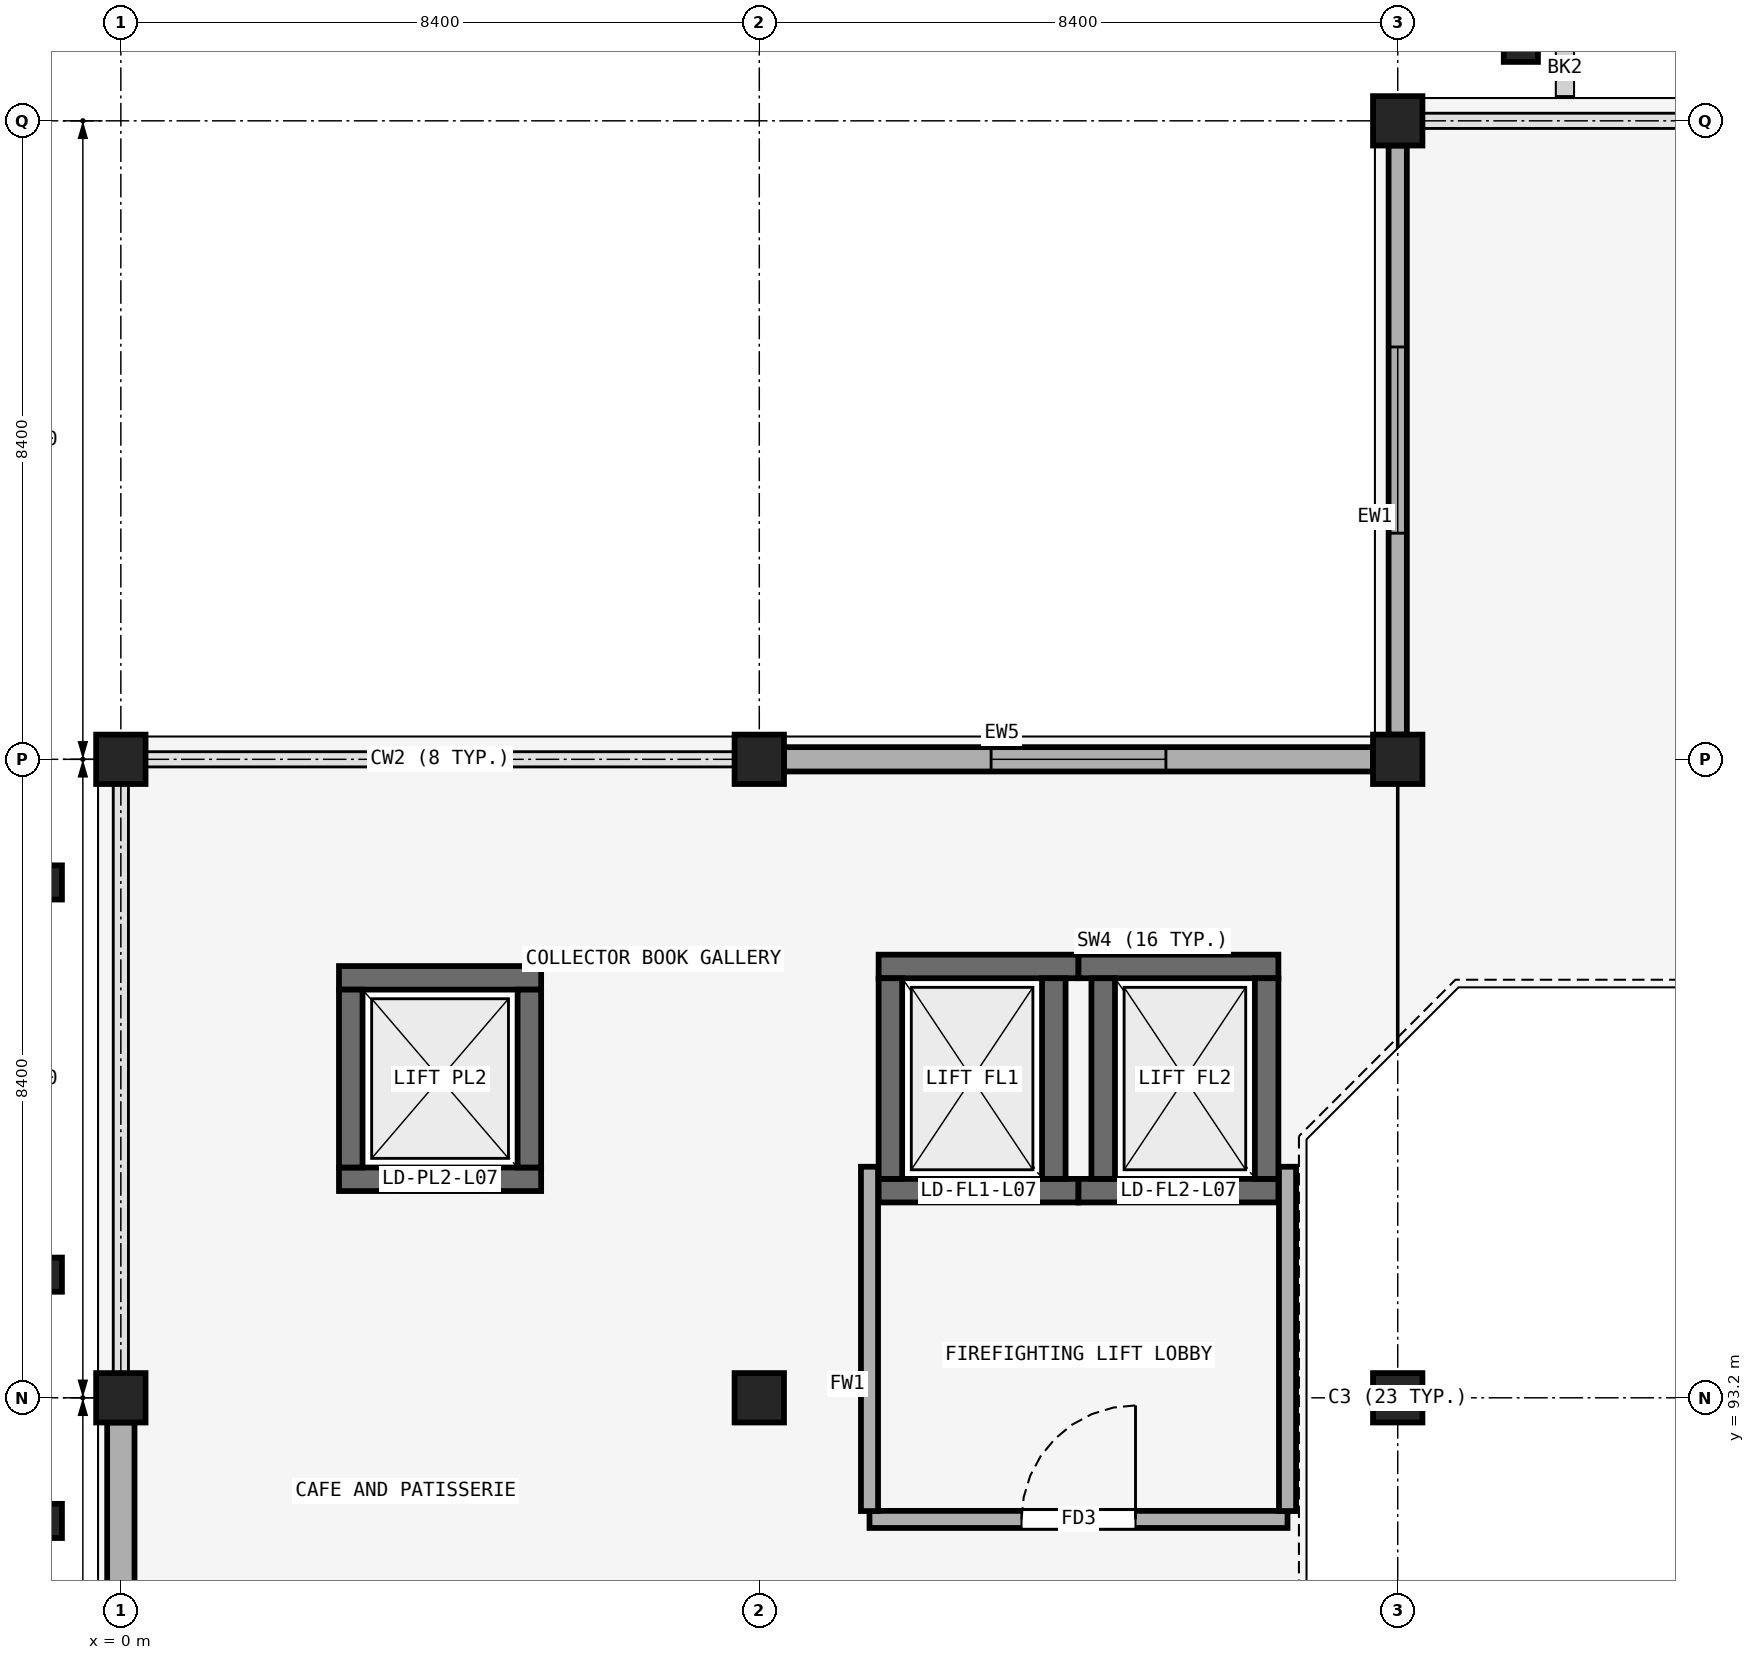
"""IFC4 building model, lengths in metres.
Left out: names, types, materials, properties, quantities, classifications, styles, units other than length and angle.
Written with IfcOpenShell. Run it as: python <this file> out.ifc"""

import sys

from ifc_helpers import new_model, si_unit, direction, frame, frame_2d, origin, origin_2d, place, context, subcontext, project, spatial, rectangle, extrude, element, fill, save


model = new_model("IFC4")
c1 = context("Model", 3, precision=1e-05, world=origin(), true_north=direction((0.0, 1.0)))
c2 = subcontext(c1, "Body", "Model", "MODEL_VIEW")
j1 = project(units=[si_unit("LENGTHUNIT", "METRE"), si_unit("PLANEANGLEUNIT", "RADIAN")], contexts=[c1])
p1 = place(None, origin())
s1 = spatial("IfcSite", under=j1, at=p1, CompositionType="ELEMENT")
p2 = place(p1, origin())
s2 = spatial("IfcBuilding", under=s1, at=p2, CompositionType="ELEMENT")
p3 = place(p2, frame((0.0, 0.0, 32.4)))
s3 = spatial("IfcBuildingStorey", under=s2, at=p3, CompositionType="ELEMENT", Elevation=32.4)
for number, where, z_axis, x_axis in (
    (1, (0.0, 93.2, 0.0), (0.0, 0.0, 1.0), (1.0, 0.0, 0.0)),
    (2, (8.4, 93.2, 0.0), (0.0, 0.0, 1.0), (1.0, 0.0, 0.0)),
    (3, (16.8, 93.2, 0.0), (0.0, 0.0, 1.0), (1.0, 0.0, 0.0)),
    (4, (0.0, 101.6, 0.0), (0.0, 0.0, 1.0), (1.0, 0.0, 0.0)),
    (5, (8.4, 101.6, 0.0), (0.0, 0.0, 1.0), (1.0, 0.0, 0.0)),
    (6, (16.8, 101.6, 0.0), (0.0, 0.0, 1.0), (1.0, 0.0, 0.0)),
    (7, (16.8, 110.0, 0.0), (0.0, 0.0, 1.0), (1.0, 0.0, 0.0)),
):
    element("IfcColumn", number, at=place(p3, frame(where, z_axis=z_axis, x_axis=x_axis)), inside=s3, PredefinedType="COLUMN", context=c2, shape_type="SweptSolid", body=[
        extrude(rectangle(XDim=0.65, YDim=0.65, at=origin_2d()), origin(), (0.0, 0.0, 1.0), 4.5),
    ])
for number, where, z_axis, x_axis in (
    (8, (18.42, 111.05, 0.0), (0.0, 0.0, 1.0), (1.0, 0.0, 0.0)),
    (9, (-1.05, 91.58, 0.0), (0.0, 0.0, 1.0), (0.0, 1.0, 0.0)),
    (10, (-1.05, 94.82, 0.0), (0.0, 0.0, 1.0), (0.0, 1.0, 0.0)),
    (11, (-1.05, 99.98, 0.0), (0.0, 0.0, 1.0), (0.0, 1.0, 0.0)),
):
    element("IfcColumn", number, at=place(p3, frame(where, z_axis=z_axis, x_axis=x_axis)), inside=s3, PredefinedType="PILASTER", context=c2, shape_type="SweptSolid", body=[
        extrude(rectangle(XDim=0.45, YDim=0.55, at=origin_2d()), origin(), (0.0, 0.0, 1.0), 4.5),
    ])
p4 = place(p3, frame((8.725, 101.6, 0.0), z_axis=(0.0, 0.0, 1.0), x_axis=(1.0, 0.0, 0.0)))
e12 = element("IfcWall", 12, at=p4, inside=s3, PredefinedType="SOLIDWALL", context=c2, shape_type="SweptSolid", body=[
    extrude(rectangle(XDim=7.75, YDim=0.32, at=frame_2d((3.875, 0.0))), origin(), (0.0, 0.0, 1.0), 3.49),
])
p5 = place(p4, frame((2.725, 0.0, 0.95)))
e13 = element("IfcOpeningElement", 13, at=p5, cuts=e12, PredefinedType="OPENING", context=c2, shape_type="SweptSolid", body=[
    extrude(rectangle(XDim=2.3, YDim=1.85, at=frame_2d((1.15, 0.925))), frame((0.0, 0.17, 0.0), z_axis=(0.0, -1.0, 0.0), x_axis=(1.0, 0.0, 0.0)), (0.0, 0.0, 1.0), 0.34),
])
p6 = place(p3, frame((0.0, 85.125, 0.0), z_axis=(0.0, 0.0, 1.0), x_axis=(0.0, 1.0, 0.0)))
e14 = element("IfcWall", 14, at=p6, inside=s3, PredefinedType="SOLIDWALL", context=c2, shape_type="SweptSolid", body=[
    extrude(rectangle(XDim=7.75, YDim=0.36, at=frame_2d((3.875, 0.0))), origin(), (0.0, 0.0, 1.0), 3.49),
])
p7 = place(p6, frame((2.65, 0.0, 0.95)))
e15 = element("IfcOpeningElement", 15, at=p7, cuts=e14, PredefinedType="OPENING", context=c2, shape_type="SweptSolid", body=[
    extrude(rectangle(XDim=2.45, YDim=1.35, at=frame_2d((1.225, 0.675))), frame((0.0, 0.19, 0.0), z_axis=(0.0, -1.0, 0.0), x_axis=(1.0, 0.0, 0.0)), (0.0, 0.0, 1.0), 0.38),
])
p8 = place(p3, frame((16.8, 101.925, 0.0), z_axis=(0.0, 0.0, 1.0), x_axis=(0.0, 1.0, 0.0)))
e16 = element("IfcWall", 16, at=p8, inside=s3, PredefinedType="SOLIDWALL", context=c2, shape_type="SweptSolid", body=[
    extrude(rectangle(XDim=7.75, YDim=0.24, at=frame_2d((3.875, 0.0))), origin(), (0.0, 0.0, 1.0), 3.49),
])
p9 = place(p8, frame((2.65, 0.0, 0.95)))
e17 = element("IfcOpeningElement", 17, at=p9, cuts=e16, PredefinedType="OPENING", context=c2, shape_type="SweptSolid", body=[
    extrude(rectangle(XDim=2.45, YDim=1.6, at=frame_2d((1.225, 0.8))), frame((0.0, 0.13, 0.0), z_axis=(0.0, -1.0, 0.0), x_axis=(1.0, 0.0, 0.0)), (0.0, 0.0, 1.0), 0.26),
])
p10 = place(p3, frame((9.97, 95.925, 0.0), z_axis=(0.0, 0.0, 1.0), x_axis=(1.0, 0.0, 0.0)))
e18 = element("IfcWall", 18, at=p10, inside=s3, PredefinedType="SHEAR", context=c2, shape_type="SweptSolid", body=[
    extrude(rectangle(XDim=2.63, YDim=0.31, at=frame_2d((1.315, 0.0))), origin(), (0.0, 0.0, 1.0), 5.9),
])
p11 = place(p10, frame((0.715, 0.0, 0.0)))
e19 = element("IfcOpeningElement", 19, at=p11, cuts=e18, PredefinedType="OPENING", context=c2, shape_type="SweptSolid", body=[
    extrude(rectangle(XDim=1.2, YDim=2.25, at=frame_2d((0.6, 1.125))), frame((0.0, 0.165, 0.0), z_axis=(0.0, -1.0, 0.0), x_axis=(1.0, 0.0, 0.0)), (0.0, 0.0, 1.0), 0.33),
])
p12 = place(p3, frame((9.97, 98.875, 0.0), z_axis=(0.0, 0.0, 1.0), x_axis=(1.0, 0.0, 0.0)))
e20 = element("IfcWall", 20, at=p12, inside=s3, PredefinedType="SHEAR", context=c2, shape_type="SweptSolid", body=[
    extrude(rectangle(XDim=2.63, YDim=0.31, at=frame_2d((1.315, 0.0))), origin(), (0.0, 0.0, 1.0), 5.9),
])
for number, where, z_axis, x_axis in (
    (21, (10.125, 96.08, 0.0), (0.0, 0.0, 1.0), (0.0, 1.0, 0.0)),
    (22, (12.275, 96.08, 0.0), (0.0, 0.0, 1.0), (0.0, 1.0, 0.0)),
):
    element("IfcWall", number, at=place(p3, frame(where, z_axis=z_axis, x_axis=x_axis)), inside=s3, PredefinedType="SHEAR", context=c2, shape_type="SweptSolid", body=[
        extrude(rectangle(XDim=2.64, YDim=0.31, at=frame_2d((1.32, 0.0))), origin(), (0.0, 0.0, 1.0), 5.9),
    ])
p13 = place(p3, frame((12.6, 95.925, 0.0), z_axis=(0.0, 0.0, 1.0), x_axis=(1.0, 0.0, 0.0)))
e23 = element("IfcWall", 23, at=p13, inside=s3, PredefinedType="SHEAR", context=c2, shape_type="SweptSolid", body=[
    extrude(rectangle(XDim=2.63, YDim=0.31, at=frame_2d((1.315, 0.0))), origin(), (0.0, 0.0, 1.0), 5.9),
])
p14 = place(p13, frame((0.715, 0.0, 0.0)))
e24 = element("IfcOpeningElement", 24, at=p14, cuts=e23, PredefinedType="OPENING", context=c2, shape_type="SweptSolid", body=[
    extrude(rectangle(XDim=1.2, YDim=2.25, at=frame_2d((0.6, 1.125))), frame((0.0, 0.165, 0.0), z_axis=(0.0, -1.0, 0.0), x_axis=(1.0, 0.0, 0.0)), (0.0, 0.0, 1.0), 0.33),
])
p15 = place(p3, frame((12.6, 98.875, 0.0), z_axis=(0.0, 0.0, 1.0), x_axis=(1.0, 0.0, 0.0)))
e25 = element("IfcWall", 25, at=p15, inside=s3, PredefinedType="SHEAR", context=c2, shape_type="SweptSolid", body=[
    extrude(rectangle(XDim=2.63, YDim=0.31, at=frame_2d((1.315, 0.0))), origin(), (0.0, 0.0, 1.0), 5.9),
])
for number, where, z_axis, x_axis in (
    (26, (12.925, 96.08, 0.0), (0.0, 0.0, 1.0), (0.0, 1.0, 0.0)),
    (27, (15.075, 96.08, 0.0), (0.0, 0.0, 1.0), (0.0, 1.0, 0.0)),
):
    element("IfcWall", number, at=place(p3, frame(where, z_axis=z_axis, x_axis=x_axis)), inside=s3, PredefinedType="SHEAR", context=c2, shape_type="SweptSolid", body=[
        extrude(rectangle(XDim=2.64, YDim=0.31, at=frame_2d((1.32, 0.0))), origin(), (0.0, 0.0, 1.0), 5.9),
    ])
p16 = place(p3, frame((2.87, 96.075, 0.0), z_axis=(0.0, 0.0, 1.0), x_axis=(1.0, 0.0, 0.0)))
e28 = element("IfcWall", 28, at=p16, inside=s3, PredefinedType="SHEAR", context=c2, shape_type="SweptSolid", body=[
    extrude(rectangle(XDim=2.66, YDim=0.31, at=frame_2d((1.33, 0.0))), origin(), (0.0, 0.0, 1.0), 5.9),
])
p17 = place(p16, frame((0.78, 0.0, 0.0)))
e29 = element("IfcOpeningElement", 29, at=p17, cuts=e28, PredefinedType="OPENING", context=c2, shape_type="SweptSolid", body=[
    extrude(rectangle(XDim=1.1, YDim=2.2, at=frame_2d((0.55, 1.1))), frame((0.0, 0.165, 0.0), z_axis=(0.0, -1.0, 0.0), x_axis=(1.0, 0.0, 0.0)), (0.0, 0.0, 1.0), 0.33),
])
p18 = place(p3, frame((2.87, 98.725, 0.0), z_axis=(0.0, 0.0, 1.0), x_axis=(1.0, 0.0, 0.0)))
e30 = element("IfcWall", 30, at=p18, inside=s3, PredefinedType="SHEAR", context=c2, shape_type="SweptSolid", body=[
    extrude(rectangle(XDim=2.66, YDim=0.31, at=frame_2d((1.33, 0.0))), origin(), (0.0, 0.0, 1.0), 5.9),
])
for number, where, z_axis, x_axis in (
    (31, (3.025, 96.23, 0.0), (0.0, 0.0, 1.0), (0.0, 1.0, 0.0)),
    (32, (5.375, 96.23, 0.0), (0.0, 0.0, 1.0), (0.0, 1.0, 0.0)),
):
    element("IfcWall", number, at=place(p3, frame(where, z_axis=z_axis, x_axis=x_axis)), inside=s3, PredefinedType="SHEAR", context=c2, shape_type="SweptSolid", body=[
        extrude(rectangle(XDim=2.34, YDim=0.31, at=frame_2d((1.17, 0.0))), origin(), (0.0, 0.0, 1.0), 5.9),
    ])
p19 = place(p3, frame((9.85, 91.6, 0.0), z_axis=(0.0, 0.0, 1.0), x_axis=(1.0, 0.0, 0.0)))
e33 = element("IfcWall", 33, at=p19, inside=s3, PredefinedType="PARTITIONING", context=c2, shape_type="SweptSolid", body=[
    extrude(rectangle(XDim=5.5, YDim=0.225, at=frame_2d((2.75, 0.0))), origin(), (0.0, 0.0, 1.0), 4.24),
])
p20 = place(p19, frame((2.0, 0.0, 0.0)))
e34 = element("IfcOpeningElement", 34, at=p20, cuts=e33, PredefinedType="OPENING", context=c2, shape_type="SweptSolid", body=[
    extrude(rectangle(XDim=1.5, YDim=2.25, at=frame_2d((0.75, 1.125))), frame((0.0, 0.123, 0.0), z_axis=(0.0, -1.0, 0.0), x_axis=(1.0, 0.0, 0.0)), (0.0, 0.0, 1.0), 0.245),
])
for number, where, z_axis, x_axis in (
    (35, (9.85, 91.71, 0.0), (0.0, 0.0, 1.0), (0.0, 1.0, 0.0)),
    (36, (15.35, 91.71, 0.0), (0.0, 0.0, 1.0), (0.0, 1.0, 0.0)),
):
    element("IfcWall", number, at=place(p3, frame(where, z_axis=z_axis, x_axis=x_axis)), inside=s3, PredefinedType="PARTITIONING", context=c2, shape_type="SweptSolid", body=[
        extrude(rectangle(XDim=4.53, YDim=0.225, at=frame_2d((2.265, 0.0))), origin(), (0.0, 0.0, 1.0), 3.54),
    ])
p21 = place(p5, origin())
e37 = element("IfcWindow", 37, at=p21, inside=s3, PartitioningType="DOUBLE_PANEL_VERTICAL", PredefinedType="WINDOW", context=c2, shape_type="SweptSolid", body=[
    extrude(rectangle(XDim=2.3, YDim=1.85, at=frame_2d((1.15, 0.925))), frame((0.0, 0.03, 0.0), z_axis=(0.0, -1.0, 0.0), x_axis=(1.0, 0.0, 0.0)), (0.0, 0.0, 1.0), 0.06),
])
fill(e13, e37)
p22 = place(p9, origin())
e38 = element("IfcWindow", 38, at=p22, inside=s3, PartitioningType="DOUBLE_PANEL_VERTICAL", PredefinedType="WINDOW", context=c2, shape_type="SweptSolid", body=[
    extrude(rectangle(XDim=2.45, YDim=1.6, at=frame_2d((1.225, 0.8))), frame((0.0, 0.03, 0.0), z_axis=(0.0, -1.0, 0.0), x_axis=(1.0, 0.0, 0.0)), (0.0, 0.0, 1.0), 0.06),
])
fill(e17, e38)
p23 = place(p11, origin())
e39 = element("IfcDoor", 39, at=p23, inside=s3, OperationType="SLIDING_TO_LEFT", PredefinedType="DOOR", context=c2, shape_type="SweptSolid", body=[
    extrude(rectangle(XDim=1.2, YDim=2.25, at=frame_2d((0.6, 1.125))), frame((0.0, 0.025, 0.0), z_axis=(0.0, -1.0, 0.0), x_axis=(1.0, 0.0, 0.0)), (0.0, 0.0, 1.0), 0.05),
])
fill(e19, e39)
p24 = place(p14, origin())
e40 = element("IfcDoor", 40, at=p24, inside=s3, OperationType="SLIDING_TO_LEFT", PredefinedType="DOOR", context=c2, shape_type="SweptSolid", body=[
    extrude(rectangle(XDim=1.2, YDim=2.25, at=frame_2d((0.6, 1.125))), frame((0.0, 0.025, 0.0), z_axis=(0.0, -1.0, 0.0), x_axis=(1.0, 0.0, 0.0)), (0.0, 0.0, 1.0), 0.05),
])
fill(e24, e40)
p25 = place(p17, origin())
e41 = element("IfcDoor", 41, at=p25, inside=s3, OperationType="SLIDING_TO_LEFT", PredefinedType="DOOR", context=c2, shape_type="SweptSolid", body=[
    extrude(rectangle(XDim=1.1, YDim=2.2, at=frame_2d((0.55, 1.1))), frame((0.0, 0.025, 0.0), z_axis=(0.0, -1.0, 0.0), x_axis=(1.0, 0.0, 0.0)), (0.0, 0.0, 1.0), 0.05),
])
fill(e29, e41)
p26 = place(p20, origin())
e42 = element("IfcDoor", 42, at=p26, inside=s3, OperationType="SINGLE_SWING_RIGHT", PredefinedType="DOOR", context=c2, shape_type="SweptSolid", body=[
    extrude(rectangle(XDim=1.5, YDim=2.25, at=frame_2d((0.75, 1.125))), frame((0.0, 0.025, 0.0), z_axis=(0.0, -1.0, 0.0), x_axis=(1.0, 0.0, 0.0)), (0.0, 0.0, 1.0), 0.05),
])
fill(e34, e42)
save(model, sys.argv[1])
